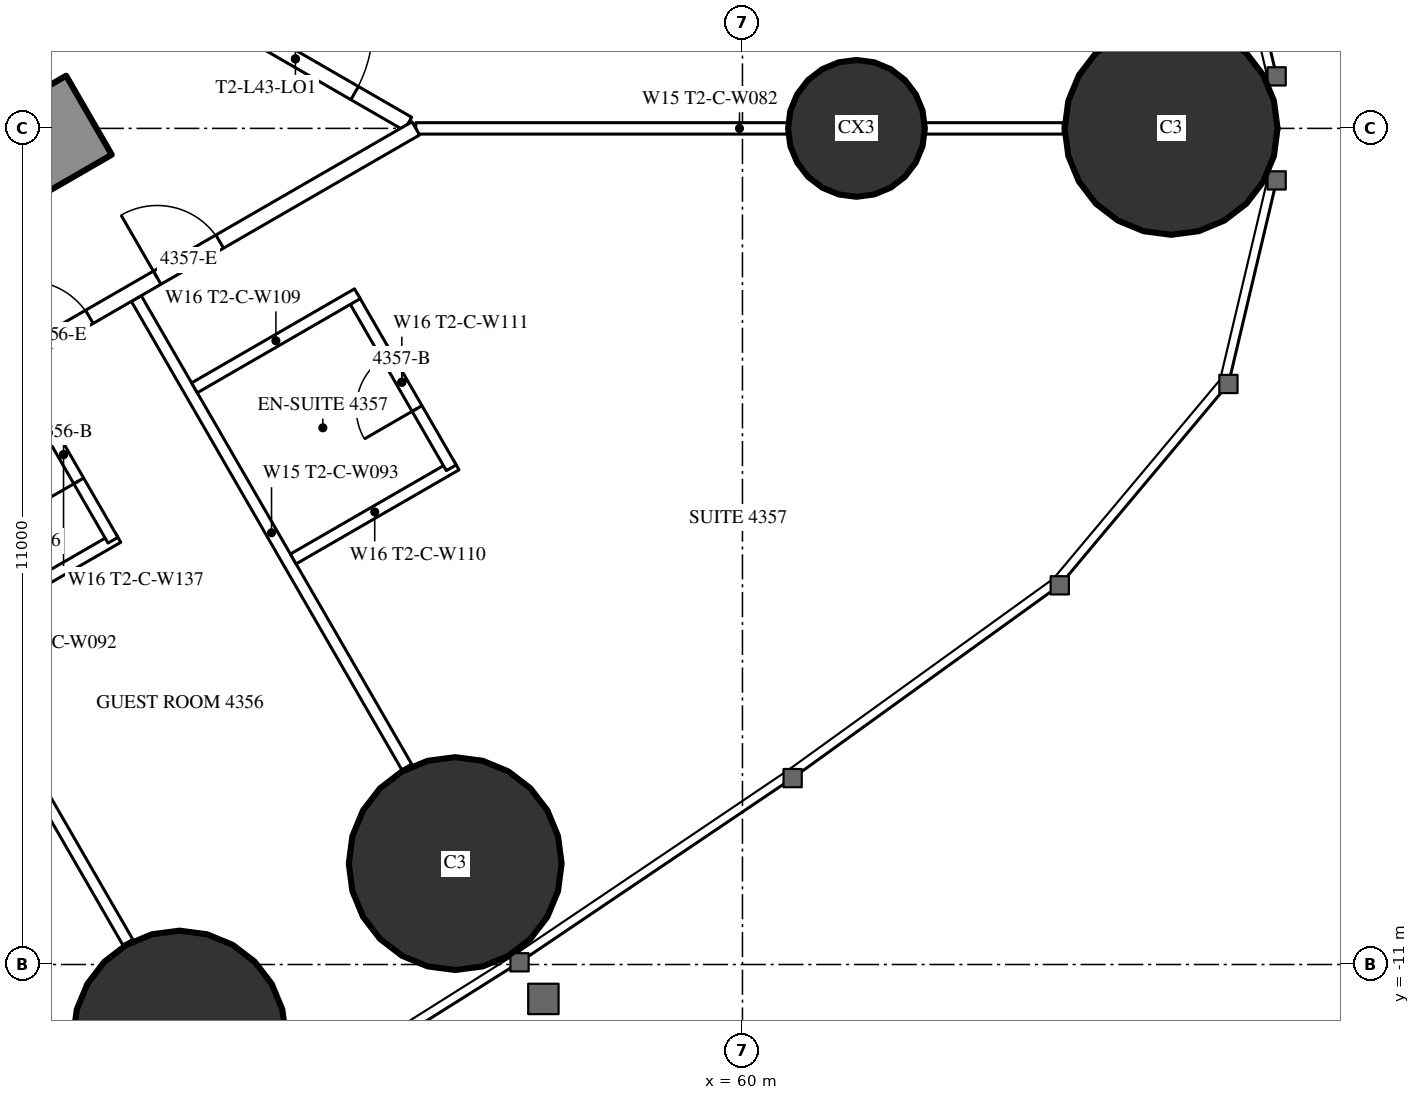
"""IFC4 building model, lengths in metres.
Left out: names, types, materials, properties, quantities, classifications, styles, units other than length and angle.
Written with IfcOpenShell. Run it as: python <this file> out.ifc"""

import sys

from ifc_helpers import new_model, si_unit, direction, frame, frame_2d, origin, origin_2d, place, context, subcontext, project, spatial, rectangle, circle, extrude, element, fill, save


model = new_model("IFC4")
c1 = context("Model", 3, precision=1e-05, world=origin(), true_north=direction((0.0, 1.0)))
c2 = subcontext(c1, "Body", "Model", "MODEL_VIEW")
j1 = project(units=[si_unit("LENGTHUNIT", "METRE"), si_unit("PLANEANGLEUNIT", "RADIAN")], contexts=[c1])
p1 = place(None, origin())
s1 = spatial("IfcSite", under=j1, at=p1, CompositionType="ELEMENT")
p2 = place(p1, origin())
s2 = spatial("IfcBuilding", under=s1, at=p2, CompositionType="ELEMENT")
p3 = place(p2, frame((0.0, 0.0, 163.3)))
s3 = spatial("IfcBuildingStorey", under=s2, at=p3, CompositionType="ELEMENT", Elevation=163.3)
for number, where, z_axis, x_axis in (
    (1, (65.64, 0.0, 0.0), (0.0, 0.0, 1.0), (1.0, 0.0, 0.0)),
    (2, (52.594, -11.955, 0.0), (0.0, 0.0, 1.0), (1.0, 0.0, 0.0)),
    (3, (56.221, -9.672, 0.0), (0.0, 0.0, 1.0), (1.0, 0.0, 0.0)),
):
    element("IfcColumn", number, at=place(p3, frame(where, z_axis=z_axis, x_axis=x_axis)), inside=s3, PredefinedType="COLUMN", context=c2, shape_type="SweptSolid", body=[
        extrude(circle(Radius=1.4, at=origin_2d()), origin(), (0.0, 0.0, 1.0), 3.5),
    ])
p4 = place(p3, frame((61.5, 0.0, 0.0), z_axis=(0.0, 0.0, 1.0), x_axis=(1.0, 0.0, 0.0)))
e4 = element("IfcColumn", 4, at=p4, inside=s3, PredefinedType="COLUMN", context=c2, shape_type="SweptSolid", body=[
    extrude(circle(Radius=0.9, at=origin_2d()), origin(), (0.0, 0.0, 1.0), 3.5),
])
p5 = place(p3, frame((27.2, -13.8, 0.0), z_axis=(0.0, 0.0, 1.0), x_axis=(0.866027159892, 0.499996958321, 0.0)))
e5 = element("IfcWall", 5, at=p5, inside=s3, PredefinedType="SHEAR", context=c2, shape_type="SweptSolid", body=[
    extrude(rectangle(XDim=27.947, YDim=1.2, at=frame_2d((13.973, 0.0))), origin(), (0.0, 0.0, 1.0), 3.5),
])
p6 = place(p5, frame((4.6, 0.0, 0.0)))
e6 = element("IfcOpeningElement", 6, at=p6, cuts=e5, PredefinedType="OPENING", context=c2, shape_type="SweptSolid", body=[
    extrude(rectangle(XDim=1.0, YDim=2.2, at=frame_2d((0.5, 1.1))), frame((0.0, 0.61, 0.0), z_axis=(0.0, -1.0, 0.0), x_axis=(1.0, 0.0, 0.0)), (0.0, 0.0, 1.0), 1.22),
])
p7 = place(p5, frame((13.395, 0.0, 0.0)))
e7 = element("IfcOpeningElement", 7, at=p7, cuts=e5, PredefinedType="OPENING", context=c2, shape_type="SweptSolid", body=[
    extrude(rectangle(XDim=1.8, YDim=2.2, at=frame_2d((0.9, 1.1))), frame((0.0, 0.61, 0.0), z_axis=(0.0, -1.0, 0.0), x_axis=(1.0, 0.0, 0.0)), (0.0, 0.0, 1.0), 1.22),
])
p8 = place(p3, frame((48.275, -4.404, 0.0), z_axis=(0.0, 0.0, 1.0), x_axis=(0.500006004368, -0.866021937133, 0.0)))
e8 = element("IfcWall", 8, at=p8, inside=s3, PredefinedType="PARTITIONING", context=c2, shape_type="SweptSolid", body=[
    extrude(rectangle(XDim=7.279, YDim=0.15, at=frame_2d((3.64, 0.0))), origin(), (0.0, 0.0, 1.0), 2.3),
])
p9 = place(p3, frame((52.025, -2.238, 0.0), z_axis=(0.0, 0.0, 1.0), x_axis=(0.499983785035, -0.866034765296, 0.0)))
e9 = element("IfcWall", 9, at=p9, inside=s3, PredefinedType="PARTITIONING", context=c2, shape_type="SweptSolid", body=[
    extrude(rectangle(XDim=7.116, YDim=0.15, at=frame_2d((3.558, 0.0))), origin(), (0.0, 0.0, 1.0), 2.3),
])
p10 = place(p3, frame((55.702, 0.0, 0.0), z_axis=(0.0, 0.0, 1.0), x_axis=(1.0, 0.0, 0.0)))
e10 = element("IfcWall", 10, at=p10, inside=s3, PredefinedType="PARTITIONING", context=c2, shape_type="SweptSolid", body=[
    extrude(rectangle(XDim=8.518, YDim=0.15, at=frame_2d((4.259, 0.0))), origin(), (0.0, 0.0, 1.0), 2.3),
])
p11 = place(p3, frame((52.639, 1.769, 0.0), z_axis=(0.0, 0.0, 1.0), x_axis=(0.866027340901, -0.4999966448, 0.0)))
e11 = element("IfcWall", 11, at=p11, inside=s3, PredefinedType="PARTITIONING", context=c2, shape_type="SweptSolid", body=[
    extrude(rectangle(XDim=3.417, YDim=0.2, at=frame_2d((1.708, 0.0))), origin(), (0.0, 0.0, 1.0), 3.25),
])
p12 = place(p11, frame((0.809, 0.0, 0.0)))
e12 = element("IfcOpeningElement", 12, at=p12, cuts=e11, PredefinedType="OPENING", context=c2, shape_type="SweptSolid", body=[
    extrude(rectangle(XDim=1.8, YDim=2.2, at=frame_2d((0.9, 1.1))), frame((0.0, 0.11, 0.0), z_axis=(0.0, -1.0, 0.0), x_axis=(1.0, 0.0, 0.0)), (0.0, 0.0, 1.0), 0.22),
])
p13 = place(p3, frame((40.741, -8.638, 0.0), z_axis=(0.0, 0.0, 1.0), x_axis=(0.866022967338, 0.500004220025, 0.0)))
e13 = element("IfcWall", 13, at=p13, inside=s3, PredefinedType="PARTITIONING", context=c2, shape_type="SweptSolid", body=[
    extrude(rectangle(XDim=17.276, YDim=0.2, at=frame_2d((8.638, 0.0))), origin(), (0.0, 0.0, 1.0), 3.25),
])
p14 = place(p13, frame((7.316, 0.0, 0.0)))
e14 = element("IfcOpeningElement", 14, at=p14, cuts=e13, PredefinedType="OPENING", context=c2, shape_type="SweptSolid", body=[
    extrude(rectangle(XDim=0.95, YDim=2.2, at=frame_2d((0.475, 1.1))), frame((0.0, 0.11, 0.0), z_axis=(0.0, -1.0, 0.0), x_axis=(1.0, 0.0, 0.0)), (0.0, 0.0, 1.0), 0.22),
])
p15 = place(p13, frame((11.366, 0.0, 0.0)))
e15 = element("IfcOpeningElement", 15, at=p15, cuts=e13, PredefinedType="OPENING", context=c2, shape_type="SweptSolid", body=[
    extrude(rectangle(XDim=0.95, YDim=2.2, at=frame_2d((0.475, 1.1))), frame((0.0, 0.11, 0.0), z_axis=(0.0, -1.0, 0.0), x_axis=(1.0, 0.0, 0.0)), (0.0, 0.0, 1.0), 0.22),
])
p16 = place(p13, frame((13.347, 0.0, 0.0)))
e16 = element("IfcOpeningElement", 16, at=p16, cuts=e13, PredefinedType="OPENING", context=c2, shape_type="SweptSolid", body=[
    extrude(rectangle(XDim=0.95, YDim=2.2, at=frame_2d((0.475, 1.1))), frame((0.0, 0.11, 0.0), z_axis=(0.0, -1.0, 0.0), x_axis=(1.0, 0.0, 0.0)), (0.0, 0.0, 1.0), 0.22),
])
p17 = place(p3, frame((49.64, -6.618, 0.0), z_axis=(0.0, 0.0, 1.0), x_axis=(0.866006523861, 0.500032699561, 0.0)))
e17 = element("IfcWall", 17, at=p17, inside=s3, PredefinedType="PARTITIONING", context=c2, shape_type="SweptSolid", body=[
    extrude(rectangle(XDim=2.475, YDim=0.15, at=frame_2d((1.237, 0.0))), origin(), (0.0, 0.0, 1.0), 3.25),
])
p18 = place(p3, frame((50.418, -3.166, 0.0), z_axis=(0.0, 0.0, 1.0), x_axis=(0.499936506574, -0.866062058628, 0.0)))
e18 = element("IfcWall", 18, at=p18, inside=s3, PredefinedType="PARTITIONING", context=c2, shape_type="SweptSolid", body=[
    extrude(rectangle(XDim=2.6, YDim=0.15, at=frame_2d((1.3, 0.0))), origin(), (0.0, 0.0, 1.0), 3.25),
])
p19 = place(p18, frame((0.9, 0.0, 0.0)))
e19 = element("IfcOpeningElement", 19, at=p19, cuts=e18, PredefinedType="OPENING", context=c2, shape_type="SweptSolid", body=[
    extrude(rectangle(XDim=0.8, YDim=2.2, at=frame_2d((0.4, 1.1))), frame((0.0, 0.085, 0.0), z_axis=(0.0, -1.0, 0.0), x_axis=(1.0, 0.0, 0.0)), (0.0, 0.0, 1.0), 0.17),
])
p20 = place(p3, frame((54.09, -5.665, 0.0), z_axis=(0.0, 0.0, 1.0), x_axis=(0.866006523861, 0.500032699561, 0.0)))
e20 = element("IfcWall", 20, at=p20, inside=s3, PredefinedType="PARTITIONING", context=c2, shape_type="SweptSolid", body=[
    extrude(rectangle(XDim=2.475, YDim=0.15, at=frame_2d((1.237, 0.0))), origin(), (0.0, 0.0, 1.0), 3.25),
])
p21 = place(p3, frame((54.869, -2.213, 0.0), z_axis=(0.0, 0.0, 1.0), x_axis=(0.500047596559, -0.865997922154, 0.0)))
e21 = element("IfcWall", 21, at=p21, inside=s3, PredefinedType="PARTITIONING", context=c2, shape_type="SweptSolid", body=[
    extrude(rectangle(XDim=2.6, YDim=0.15, at=frame_2d((1.3, 0.0))), origin(), (0.0, 0.0, 1.0), 3.25),
])
p22 = place(p21, frame((0.9, 0.0, 0.0)))
e22 = element("IfcOpeningElement", 22, at=p22, cuts=e21, PredefinedType="OPENING", context=c2, shape_type="SweptSolid", body=[
    extrude(rectangle(XDim=0.8, YDim=2.2, at=frame_2d((0.4, 1.1))), frame((0.0, 0.085, 0.0), z_axis=(0.0, -1.0, 0.0), x_axis=(1.0, 0.0, 0.0)), (0.0, 0.0, 1.0), 0.17),
])
p23 = place(p3, frame((52.79, -3.413, 0.0), z_axis=(0.0, 0.0, 1.0), x_axis=(0.866006523861, 0.500032699561, 0.0)))
e23 = element("IfcWall", 23, at=p23, inside=s3, PredefinedType="PARTITIONING", context=c2, shape_type="SweptSolid", body=[
    extrude(rectangle(XDim=2.475, YDim=0.15, at=frame_2d((1.237, 0.0))), origin(), (0.0, 0.0, 1.0), 3.25),
])
p24 = place(p19, origin())
e24 = element("IfcDoor", 24, at=p24, inside=s3, OperationType="SINGLE_SWING_RIGHT", PredefinedType="DOOR", context=c2, shape_type="SweptSolid", body=[
    extrude(rectangle(XDim=0.8, YDim=2.2, at=frame_2d((0.4, 1.1))), frame((0.0, 0.025, 0.0), z_axis=(0.0, -1.0, 0.0), x_axis=(1.0, 0.0, 0.0)), (0.0, 0.0, 1.0), 0.05),
])
fill(e19, e24)
p25 = place(p15, origin())
e25 = element("IfcDoor", 25, at=p25, inside=s3, OperationType="SINGLE_SWING_LEFT", PredefinedType="DOOR", context=c2, shape_type="SweptSolid", body=[
    extrude(rectangle(XDim=0.95, YDim=2.2, at=frame_2d((0.475, 1.1))), frame((0.0, 0.025, 0.0), z_axis=(0.0, -1.0, 0.0), x_axis=(1.0, 0.0, 0.0)), (0.0, 0.0, 1.0), 0.05),
])
fill(e15, e25)
p26 = place(p22, origin())
e26 = element("IfcDoor", 26, at=p26, inside=s3, OperationType="SINGLE_SWING_RIGHT", PredefinedType="DOOR", context=c2, shape_type="SweptSolid", body=[
    extrude(rectangle(XDim=0.8, YDim=2.2, at=frame_2d((0.4, 1.1))), frame((0.0, 0.025, 0.0), z_axis=(0.0, -1.0, 0.0), x_axis=(1.0, 0.0, 0.0)), (0.0, 0.0, 1.0), 0.05),
])
fill(e22, e26)
p27 = place(p16, origin())
e27 = element("IfcDoor", 27, at=p27, inside=s3, OperationType="SINGLE_SWING_LEFT", PredefinedType="DOOR", context=c2, shape_type="SweptSolid", body=[
    extrude(rectangle(XDim=0.95, YDim=2.2, at=frame_2d((0.475, 1.1))), frame((0.0, 0.025, 0.0), z_axis=(0.0, -1.0, 0.0), x_axis=(1.0, 0.0, 0.0)), (0.0, 0.0, 1.0), 0.05),
])
fill(e16, e27)
p28 = place(p12, origin())
e28 = element("IfcDoor", 28, at=p28, inside=s3, OperationType="DOUBLE_DOOR_SINGLE_SWING", PredefinedType="DOOR", context=c2, shape_type="SweptSolid", body=[
    extrude(rectangle(XDim=1.8, YDim=2.2, at=frame_2d((0.9, 1.1))), frame((0.0, 0.025, 0.0), z_axis=(0.0, -1.0, 0.0), x_axis=(1.0, 0.0, 0.0)), (0.0, 0.0, 1.0), 0.05),
])
fill(e12, e28)
save(model, sys.argv[1])
